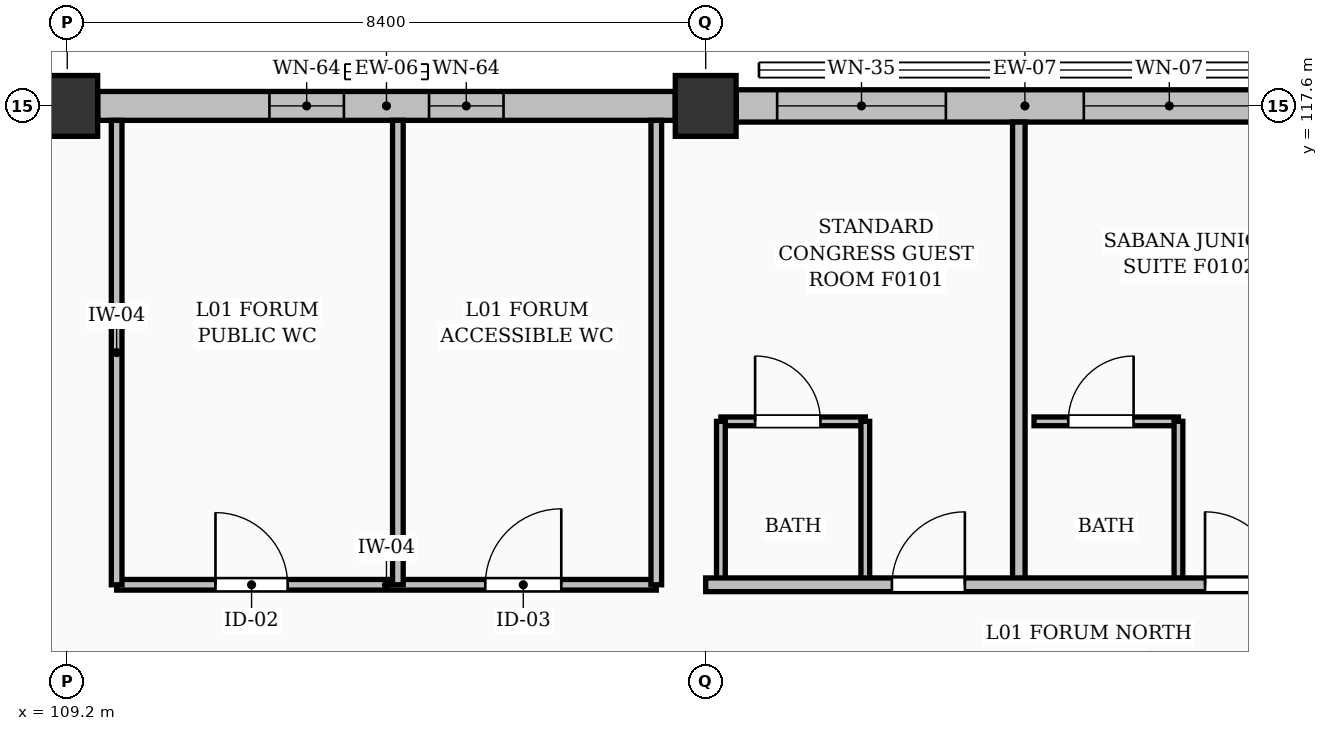
"""IFC4 building model, lengths in metres.
Left out: names, types, materials, properties, quantities, classifications, styles, units other than length and angle.
Written with IfcOpenShell. Run it as: python <this file> out.ifc"""

import sys

from ifc_helpers import new_model, si_unit, direction, frame, frame_2d, origin, origin_2d, place, context, subcontext, project, spatial, rectangle, extrude, element, fill, save


model = new_model("IFC4")
c1 = context("Model", 3, precision=1e-05, world=origin(), true_north=direction((0.0, 1.0)))
c2 = subcontext(c1, "Body", "Model", "MODEL_VIEW")
j1 = project(units=[si_unit("LENGTHUNIT", "METRE"), si_unit("PLANEANGLEUNIT", "RADIAN")], contexts=[c1])
p1 = place(None, origin())
s1 = spatial("IfcSite", under=j1, at=p1, CompositionType="ELEMENT")
p2 = place(p1, origin())
s2 = spatial("IfcBuilding", under=s1, at=p2, CompositionType="ELEMENT")
p3 = place(p2, frame((0.0, 0.0, 3.92)))
s3 = spatial("IfcBuildingStorey", under=s2, at=p3, CompositionType="ELEMENT", Elevation=3.92)
for number, where, z_axis, x_axis in (
    (1, (109.2, 117.6, 0.0), (0.0, 0.0, 1.0), (1.0, 0.0, 0.0)),
    (2, (117.6, 117.6, 0.0), (0.0, 0.0, 1.0), (1.0, 0.0, 0.0)),
):
    element("IfcColumn", number, at=place(p3, frame(where, z_axis=z_axis, x_axis=x_axis)), inside=s3, PredefinedType="COLUMN", context=c2, shape_type="SweptSolid", body=[
        extrude(rectangle(XDim=0.8, YDim=0.8, at=origin_2d()), origin(), (0.0, 0.0, 1.0), 3.64),
    ])
p4 = place(p3, frame((109.601, 117.6, 0.0), z_axis=(0.0, 0.0, 1.0), x_axis=(1.0, 0.0, 0.0)))
e3 = element("IfcWall", 3, at=p4, inside=s3, PredefinedType="SOLIDWALL", context=c2, shape_type="SweptSolid", body=[
    extrude(rectangle(XDim=7.598, YDim=0.38, at=frame_2d((3.799, 0.0))), origin(), (0.0, 0.0, 1.0), 2.445),
])
p5 = place(p4, frame((2.259, 0.0, 0.3)))
e4 = element("IfcOpeningElement", 4, at=p5, cuts=e3, PredefinedType="OPENING", context=c2, shape_type="SweptSolid", body=[
    extrude(rectangle(XDim=0.98, YDim=1.75, at=frame_2d((0.49, 0.875))), frame((0.0, 0.2, 0.0), z_axis=(0.0, -1.0, 0.0), x_axis=(1.0, 0.0, 0.0)), (0.0, 0.0, 1.0), 0.4),
])
p6 = place(p4, frame((4.359, 0.0, 0.3)))
e5 = element("IfcOpeningElement", 5, at=p6, cuts=e3, PredefinedType="OPENING", context=c2, shape_type="SweptSolid", body=[
    extrude(rectangle(XDim=0.98, YDim=1.75, at=frame_2d((0.49, 0.875))), frame((0.0, 0.2, 0.0), z_axis=(0.0, -1.0, 0.0), x_axis=(1.0, 0.0, 0.0)), (0.0, 0.0, 1.0), 0.4),
])
p7 = place(p3, frame((118.001, 117.6, 0.0), z_axis=(0.0, 0.0, 1.0), x_axis=(1.0, 0.0, 0.0)))
e6 = element("IfcWall", 6, at=p7, inside=s3, PredefinedType="SOLIDWALL", context=c2, shape_type="SweptSolid", body=[
    extrude(rectangle(XDim=7.598, YDim=0.425, at=frame_2d((3.799, 0.0))), origin(), (0.0, 0.0, 1.0), 2.445),
])
p8 = place(p7, frame((0.539, 0.0, 0.25)))
e7 = element("IfcOpeningElement", 7, at=p8, cuts=e6, PredefinedType="OPENING", context=c2, shape_type="SweptSolid", body=[
    extrude(rectangle(XDim=2.22, YDim=1.9, at=frame_2d((1.11, 0.95))), frame((0.0, 0.223, 0.0), z_axis=(0.0, -1.0, 0.0), x_axis=(1.0, 0.0, 0.0)), (0.0, 0.0, 1.0), 0.445),
])
p9 = place(p7, frame((4.574, 0.0, 0.25)))
e8 = element("IfcOpeningElement", 8, at=p9, cuts=e6, PredefinedType="OPENING", context=c2, shape_type="SweptSolid", body=[
    extrude(rectangle(XDim=2.25, YDim=1.95, at=frame_2d((1.125, 0.975))), frame((0.0, 0.223, 0.0), z_axis=(0.0, -1.0, 0.0), x_axis=(1.0, 0.0, 0.0)), (0.0, 0.0, 1.0), 0.445),
])
p10 = place(p3, frame((109.85, 111.3, 0.0), z_axis=(0.0, 0.0, 1.0), x_axis=(1.0, 0.0, 0.0)))
e9 = element("IfcWall", 9, at=p10, inside=s3, PredefinedType="PARTITIONING", context=c2, shape_type="SweptSolid", body=[
    extrude(rectangle(XDim=7.1, YDim=0.14, at=frame_2d((3.55, 0.0))), origin(), (0.0, 0.0, 1.0), 3.36),
])
p11 = place(p10, frame((1.3, 0.0, 0.0)))
e10 = element("IfcOpeningElement", 10, at=p11, cuts=e9, PredefinedType="OPENING", context=c2, shape_type="SweptSolid", body=[
    extrude(rectangle(XDim=0.95, YDim=2.1, at=frame_2d((0.475, 1.05))), frame((0.0, 0.08, 0.0), z_axis=(0.0, -1.0, 0.0), x_axis=(1.0, 0.0, 0.0)), (0.0, 0.0, 1.0), 0.16),
])
p12 = place(p10, frame((4.85, 0.0, 0.0)))
e11 = element("IfcOpeningElement", 11, at=p12, cuts=e9, PredefinedType="OPENING", context=c2, shape_type="SweptSolid", body=[
    extrude(rectangle(XDim=1.0, YDim=2.1, at=frame_2d((0.5, 1.05))), frame((0.0, 0.08, 0.0), z_axis=(0.0, -1.0, 0.0), x_axis=(1.0, 0.0, 0.0)), (0.0, 0.0, 1.0), 0.16),
])
for number, where, z_axis, x_axis in (
    (12, (109.85, 111.3, 0.0), (0.0, 0.0, 1.0), (0.0, 1.0, 0.0)),
    (13, (113.55, 111.3, 0.0), (0.0, 0.0, 1.0), (0.0, 1.0, 0.0)),
    (14, (116.95, 111.3, 0.0), (0.0, 0.0, 1.0), (0.0, 1.0, 0.0)),
):
    element("IfcWall", number, at=place(p3, frame(where, z_axis=z_axis, x_axis=x_axis)), inside=s3, PredefinedType="PARTITIONING", context=c2, shape_type="SweptSolid", body=[
        extrude(rectangle(XDim=6.11, YDim=0.14, at=frame_2d((3.055, 0.0))), origin(), (0.0, 0.0, 1.0), 3.36),
    ])
p13 = place(p3, frame((117.8, 113.45, 0.0), z_axis=(0.0, 0.0, 1.0), x_axis=(1.0, 0.0, 0.0)))
e15 = element("IfcWall", 15, at=p13, inside=s3, PredefinedType="PARTITIONING", context=c2, shape_type="SweptSolid", body=[
    extrude(rectangle(XDim=1.9, YDim=0.115, at=frame_2d((0.95, 0.0))), origin(), (0.0, 0.0, 1.0), 3.36),
])
p14 = place(p13, frame((0.45, 0.0, 0.0)))
e16 = element("IfcOpeningElement", 16, at=p14, cuts=e15, PredefinedType="OPENING", context=c2, shape_type="SweptSolid", body=[
    extrude(rectangle(XDim=0.86, YDim=2.05, at=frame_2d((0.43, 1.025))), frame((0.0, 0.067, 0.0), z_axis=(0.0, -1.0, 0.0), x_axis=(1.0, 0.0, 0.0)), (0.0, 0.0, 1.0), 0.135),
])
p15 = place(p3, frame((119.7, 111.3, 0.0), z_axis=(0.0, 0.0, 1.0), x_axis=(0.0, 1.0, 0.0)))
e17 = element("IfcWall", 17, at=p15, inside=s3, PredefinedType="PARTITIONING", context=c2, shape_type="SweptSolid", body=[
    extrude(rectangle(XDim=2.15, YDim=0.115, at=frame_2d((1.075, 0.0))), origin(), (0.0, 0.0, 1.0), 3.36),
])
p16 = place(p3, frame((117.8, 111.3, 0.0), z_axis=(0.0, 0.0, 1.0), x_axis=(0.0, 1.0, 0.0)))
e18 = element("IfcWall", 18, at=p16, inside=s3, PredefinedType="PARTITIONING", context=c2, shape_type="SweptSolid", body=[
    extrude(rectangle(XDim=2.15, YDim=0.115, at=frame_2d((1.075, 0.0))), origin(), (0.0, 0.0, 1.0), 2.595),
])
p17 = place(p3, frame((121.92, 113.45, 0.0), z_axis=(0.0, 0.0, 1.0), x_axis=(1.0, 0.0, 0.0)))
e19 = element("IfcWall", 19, at=p17, inside=s3, PredefinedType="PARTITIONING", context=c2, shape_type="SweptSolid", body=[
    extrude(rectangle(XDim=1.9, YDim=0.115, at=frame_2d((0.95, 0.0))), origin(), (0.0, 0.0, 1.0), 3.36),
])
p18 = place(p17, frame((0.45, 0.0, 0.0)))
e20 = element("IfcOpeningElement", 20, at=p18, cuts=e19, PredefinedType="OPENING", context=c2, shape_type="SweptSolid", body=[
    extrude(rectangle(XDim=0.86, YDim=2.05, at=frame_2d((0.43, 1.025))), frame((0.0, 0.067, 0.0), z_axis=(0.0, -1.0, 0.0), x_axis=(1.0, 0.0, 0.0)), (0.0, 0.0, 1.0), 0.135),
])
p19 = place(p3, frame((123.82, 111.3, 0.0), z_axis=(0.0, 0.0, 1.0), x_axis=(0.0, 1.0, 0.0)))
e21 = element("IfcWall", 21, at=p19, inside=s3, PredefinedType="PARTITIONING", context=c2, shape_type="SweptSolid", body=[
    extrude(rectangle(XDim=2.15, YDim=0.115, at=frame_2d((1.075, 0.0))), origin(), (0.0, 0.0, 1.0), 3.36),
])
p20 = place(p3, frame((121.72, 111.3, 0.0), z_axis=(0.0, 0.0, 1.0), x_axis=(0.0, 1.0, 0.0)))
e22 = element("IfcWall", 22, at=p20, inside=s3, PredefinedType="PARTITIONING", context=c2, shape_type="SweptSolid", body=[
    extrude(rectangle(XDim=6.087, YDim=0.165, at=frame_2d((3.044, 0.0))), origin(), (0.0, 0.0, 1.0), 3.36),
])
p21 = place(p3, frame((117.6, 111.3, 0.0), z_axis=(0.0, 0.0, 1.0), x_axis=(1.0, 0.0, 0.0)))
e23 = element("IfcWall", 23, at=p21, inside=s3, PredefinedType="PARTITIONING", context=c2, shape_type="SweptSolid", body=[
    extrude(rectangle(XDim=50.32, YDim=0.18, at=frame_2d((25.16, 0.0))), origin(), (0.0, 0.0, 1.0), 3.36),
])
p22 = place(p21, frame((2.45, 0.0, 0.0)))
e24 = element("IfcOpeningElement", 24, at=p22, cuts=e23, PredefinedType="OPENING", context=c2, shape_type="SweptSolid", body=[
    extrude(rectangle(XDim=0.96, YDim=2.15, at=frame_2d((0.48, 1.075))), frame((0.0, 0.1, 0.0), z_axis=(0.0, -1.0, 0.0), x_axis=(1.0, 0.0, 0.0)), (0.0, 0.0, 1.0), 0.2),
])
p23 = place(p21, frame((6.57, 0.0, 0.0)))
e25 = element("IfcOpeningElement", 25, at=p23, cuts=e23, PredefinedType="OPENING", context=c2, shape_type="SweptSolid", body=[
    extrude(rectangle(XDim=0.96, YDim=2.15, at=frame_2d((0.48, 1.075))), frame((0.0, 0.1, 0.0), z_axis=(0.0, -1.0, 0.0), x_axis=(1.0, 0.0, 0.0)), (0.0, 0.0, 1.0), 0.2),
])
p24 = place(p21, frame((10.69, 0.0, 0.0)))
e26 = element("IfcOpeningElement", 26, at=p24, cuts=e23, PredefinedType="OPENING", context=c2, shape_type="SweptSolid", body=[
    extrude(rectangle(XDim=0.96, YDim=2.15, at=frame_2d((0.48, 1.075))), frame((0.0, 0.1, 0.0), z_axis=(0.0, -1.0, 0.0), x_axis=(1.0, 0.0, 0.0)), (0.0, 0.0, 1.0), 0.2),
])
p25 = place(p21, frame((14.81, 0.0, 0.0)))
e27 = element("IfcOpeningElement", 27, at=p25, cuts=e23, PredefinedType="OPENING", context=c2, shape_type="SweptSolid", body=[
    extrude(rectangle(XDim=0.96, YDim=2.15, at=frame_2d((0.48, 1.075))), frame((0.0, 0.1, 0.0), z_axis=(0.0, -1.0, 0.0), x_axis=(1.0, 0.0, 0.0)), (0.0, 0.0, 1.0), 0.2),
])
p26 = place(p21, frame((18.93, 0.0, 0.0)))
e28 = element("IfcOpeningElement", 28, at=p26, cuts=e23, PredefinedType="OPENING", context=c2, shape_type="SweptSolid", body=[
    extrude(rectangle(XDim=0.96, YDim=2.15, at=frame_2d((0.48, 1.075))), frame((0.0, 0.1, 0.0), z_axis=(0.0, -1.0, 0.0), x_axis=(1.0, 0.0, 0.0)), (0.0, 0.0, 1.0), 0.2),
])
p27 = place(p21, frame((23.05, 0.0, 0.0)))
e29 = element("IfcOpeningElement", 29, at=p27, cuts=e23, PredefinedType="OPENING", context=c2, shape_type="SweptSolid", body=[
    extrude(rectangle(XDim=0.96, YDim=2.15, at=frame_2d((0.48, 1.075))), frame((0.0, 0.1, 0.0), z_axis=(0.0, -1.0, 0.0), x_axis=(1.0, 0.0, 0.0)), (0.0, 0.0, 1.0), 0.2),
])
p28 = place(p21, frame((27.17, 0.0, 0.0)))
e30 = element("IfcOpeningElement", 30, at=p28, cuts=e23, PredefinedType="OPENING", context=c2, shape_type="SweptSolid", body=[
    extrude(rectangle(XDim=0.96, YDim=2.15, at=frame_2d((0.48, 1.075))), frame((0.0, 0.1, 0.0), z_axis=(0.0, -1.0, 0.0), x_axis=(1.0, 0.0, 0.0)), (0.0, 0.0, 1.0), 0.2),
])
p29 = place(p21, frame((31.29, 0.0, 0.0)))
e31 = element("IfcOpeningElement", 31, at=p29, cuts=e23, PredefinedType="OPENING", context=c2, shape_type="SweptSolid", body=[
    extrude(rectangle(XDim=0.96, YDim=2.15, at=frame_2d((0.48, 1.075))), frame((0.0, 0.1, 0.0), z_axis=(0.0, -1.0, 0.0), x_axis=(1.0, 0.0, 0.0)), (0.0, 0.0, 1.0), 0.2),
])
p30 = place(p21, frame((35.41, 0.0, 0.0)))
e32 = element("IfcOpeningElement", 32, at=p30, cuts=e23, PredefinedType="OPENING", context=c2, shape_type="SweptSolid", body=[
    extrude(rectangle(XDim=0.96, YDim=2.15, at=frame_2d((0.48, 1.075))), frame((0.0, 0.1, 0.0), z_axis=(0.0, -1.0, 0.0), x_axis=(1.0, 0.0, 0.0)), (0.0, 0.0, 1.0), 0.2),
])
p31 = place(p21, frame((39.53, 0.0, 0.0)))
e33 = element("IfcOpeningElement", 33, at=p31, cuts=e23, PredefinedType="OPENING", context=c2, shape_type="SweptSolid", body=[
    extrude(rectangle(XDim=0.96, YDim=2.15, at=frame_2d((0.48, 1.075))), frame((0.0, 0.1, 0.0), z_axis=(0.0, -1.0, 0.0), x_axis=(1.0, 0.0, 0.0)), (0.0, 0.0, 1.0), 0.2),
])
p32 = place(p21, frame((43.65, 0.0, 0.0)))
e34 = element("IfcOpeningElement", 34, at=p32, cuts=e23, PredefinedType="OPENING", context=c2, shape_type="SweptSolid", body=[
    extrude(rectangle(XDim=0.96, YDim=2.15, at=frame_2d((0.48, 1.075))), frame((0.0, 0.1, 0.0), z_axis=(0.0, -1.0, 0.0), x_axis=(1.0, 0.0, 0.0)), (0.0, 0.0, 1.0), 0.2),
])
p33 = place(p21, frame((47.77, 0.0, 0.0)))
e35 = element("IfcOpeningElement", 35, at=p33, cuts=e23, PredefinedType="OPENING", context=c2, shape_type="SweptSolid", body=[
    extrude(rectangle(XDim=0.96, YDim=2.15, at=frame_2d((0.48, 1.075))), frame((0.0, 0.1, 0.0), z_axis=(0.0, -1.0, 0.0), x_axis=(1.0, 0.0, 0.0)), (0.0, 0.0, 1.0), 0.2),
])
p34 = place(p5, origin())
e36 = element("IfcWindow", 36, at=p34, inside=s3, PartitioningType="SINGLE_PANEL", PredefinedType="WINDOW", context=c2, shape_type="SweptSolid", body=[
    extrude(rectangle(XDim=0.98, YDim=1.75, at=frame_2d((0.49, 0.875))), frame((0.0, 0.03, 0.0), z_axis=(0.0, -1.0, 0.0), x_axis=(1.0, 0.0, 0.0)), (0.0, 0.0, 1.0), 0.06),
])
fill(e4, e36)
p35 = place(p6, origin())
e37 = element("IfcWindow", 37, at=p35, inside=s3, PartitioningType="SINGLE_PANEL", PredefinedType="WINDOW", context=c2, shape_type="SweptSolid", body=[
    extrude(rectangle(XDim=0.98, YDim=1.75, at=frame_2d((0.49, 0.875))), frame((0.0, 0.03, 0.0), z_axis=(0.0, -1.0, 0.0), x_axis=(1.0, 0.0, 0.0)), (0.0, 0.0, 1.0), 0.06),
])
fill(e5, e37)
p36 = place(p8, origin())
e38 = element("IfcWindow", 38, at=p36, inside=s3, PartitioningType="DOUBLE_PANEL_VERTICAL", PredefinedType="WINDOW", context=c2, shape_type="SweptSolid", body=[
    extrude(rectangle(XDim=2.22, YDim=1.9, at=frame_2d((1.11, 0.95))), frame((0.0, 0.03, 0.0), z_axis=(0.0, -1.0, 0.0), x_axis=(1.0, 0.0, 0.0)), (0.0, 0.0, 1.0), 0.06),
])
fill(e7, e38)
p37 = place(p9, origin())
e39 = element("IfcWindow", 39, at=p37, inside=s3, PartitioningType="DOUBLE_PANEL_VERTICAL", PredefinedType="WINDOW", context=c2, shape_type="SweptSolid", body=[
    extrude(rectangle(XDim=2.25, YDim=1.95, at=frame_2d((1.125, 0.975))), frame((0.0, 0.03, 0.0), z_axis=(0.0, -1.0, 0.0), x_axis=(1.0, 0.0, 0.0)), (0.0, 0.0, 1.0), 0.06),
])
fill(e8, e39)
p38 = place(p11, origin())
e40 = element("IfcDoor", 40, at=p38, inside=s3, OperationType="SINGLE_SWING_LEFT", PredefinedType="DOOR", context=c2, shape_type="SweptSolid", body=[
    extrude(rectangle(XDim=0.95, YDim=2.1, at=frame_2d((0.475, 1.05))), frame((0.0, 0.025, 0.0), z_axis=(0.0, -1.0, 0.0), x_axis=(1.0, 0.0, 0.0)), (0.0, 0.0, 1.0), 0.05),
])
fill(e10, e40)
p39 = place(p12, origin())
e41 = element("IfcDoor", 41, at=p39, inside=s3, OperationType="SINGLE_SWING_RIGHT", PredefinedType="DOOR", context=c2, shape_type="SweptSolid", body=[
    extrude(rectangle(XDim=1.0, YDim=2.1, at=frame_2d((0.5, 1.05))), frame((0.0, 0.025, 0.0), z_axis=(0.0, -1.0, 0.0), x_axis=(1.0, 0.0, 0.0)), (0.0, 0.0, 1.0), 0.05),
])
fill(e11, e41)
p40 = place(p14, origin())
e42 = element("IfcDoor", 42, at=p40, inside=s3, OperationType="SINGLE_SWING_LEFT", PredefinedType="DOOR", context=c2, shape_type="SweptSolid", body=[
    extrude(rectangle(XDim=0.86, YDim=2.05, at=frame_2d((0.43, 1.025))), frame((0.0, 0.025, 0.0), z_axis=(0.0, -1.0, 0.0), x_axis=(1.0, 0.0, 0.0)), (0.0, 0.0, 1.0), 0.05),
])
fill(e16, e42)
p41 = place(p18, origin())
e43 = element("IfcDoor", 43, at=p41, inside=s3, OperationType="SINGLE_SWING_RIGHT", PredefinedType="DOOR", context=c2, shape_type="SweptSolid", body=[
    extrude(rectangle(XDim=0.86, YDim=2.05, at=frame_2d((0.43, 1.025))), frame((0.0, 0.025, 0.0), z_axis=(0.0, -1.0, 0.0), x_axis=(1.0, 0.0, 0.0)), (0.0, 0.0, 1.0), 0.05),
])
fill(e20, e43)
p42 = place(p22, origin())
e44 = element("IfcDoor", 44, at=p42, inside=s3, OperationType="SINGLE_SWING_RIGHT", PredefinedType="DOOR", context=c2, shape_type="SweptSolid", body=[
    extrude(rectangle(XDim=0.96, YDim=2.15, at=frame_2d((0.48, 1.075))), frame((0.0, 0.025, 0.0), z_axis=(0.0, -1.0, 0.0), x_axis=(1.0, 0.0, 0.0)), (0.0, 0.0, 1.0), 0.05),
])
fill(e24, e44)
p43 = place(p23, origin())
e45 = element("IfcDoor", 45, at=p43, inside=s3, OperationType="SINGLE_SWING_LEFT", PredefinedType="DOOR", context=c2, shape_type="SweptSolid", body=[
    extrude(rectangle(XDim=0.96, YDim=2.15, at=frame_2d((0.48, 1.075))), frame((0.0, 0.025, 0.0), z_axis=(0.0, -1.0, 0.0), x_axis=(1.0, 0.0, 0.0)), (0.0, 0.0, 1.0), 0.05),
])
fill(e25, e45)
save(model, sys.argv[1])
